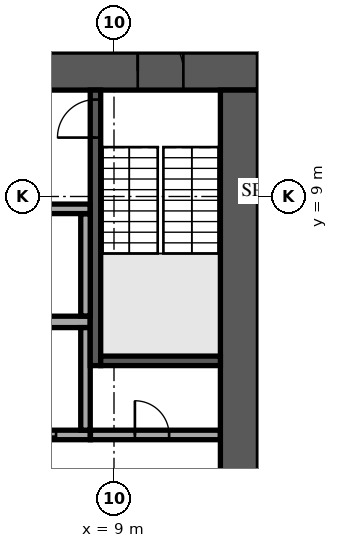
"""IFC4 building model, lengths in metres.
Left out: names, types, materials, properties, quantities, classifications, styles, units other than length and angle.
Written with IfcOpenShell. Run it as: python <this file> out.ifc"""

import sys

from ifc_helpers import new_model, si_unit, direction, frame, frame_2d, origin, place, context, subcontext, project, spatial, rectangle, extrude, element, fill, save


model = new_model("IFC4")
c1 = context("Model", 3, precision=1e-05, world=origin(), true_north=direction((0.0, 1.0)))
c2 = subcontext(c1, "Body", "Model", "MODEL_VIEW")
j1 = project(units=[si_unit("LENGTHUNIT", "METRE"), si_unit("PLANEANGLEUNIT", "RADIAN")], contexts=[c1])
p1 = place(None, origin())
s1 = spatial("IfcSite", under=j1, at=p1, CompositionType="ELEMENT")
p2 = place(p1, origin())
s2 = spatial("IfcBuilding", under=s1, at=p2, CompositionType="ELEMENT")
p3 = place(p2, frame((0.0, 0.0, 175.7)))
s3 = spatial("IfcBuildingStorey", under=s2, at=p3, CompositionType="ELEMENT", Elevation=175.7)
p4 = place(p3, frame((-12.8, 12.3, 0.0), z_axis=(0.0, 0.0, 1.0), x_axis=(1.0, 0.0, 0.0)))
e1 = element("IfcWall", 1, at=p4, inside=s3, PredefinedType="SHEAR", context=c2, shape_type="SweptSolid", body=[
    extrude(rectangle(XDim=25.6, YDim=1.0, at=frame_2d((12.8, 0.0))), origin(), (0.0, 0.0, 1.0), 3.6),
])
p5 = place(p4, frame((11.6, 0.0, 0.0)))
e2 = element("IfcOpeningElement", 2, at=p5, cuts=e1, PredefinedType="OPENING", context=c2, shape_type="SweptSolid", body=[
    extrude(rectangle(XDim=2.4, YDim=2.4, at=frame_2d((1.2, 1.2))), frame((0.0, 0.51, 0.0), z_axis=(0.0, -1.0, 0.0), x_axis=(1.0, 0.0, 0.0)), (0.0, 0.0, 1.0), 1.02),
])
p6 = place(p4, frame((22.425, 0.0, 0.0)))
e3 = element("IfcOpeningElement", 3, at=p6, cuts=e1, PredefinedType="OPENING", context=c2, shape_type="SweptSolid", body=[
    extrude(rectangle(XDim=1.2, YDim=2.1, at=frame_2d((0.6, 1.05))), frame((0.0, 0.51, 0.0), z_axis=(0.0, -1.0, 0.0), x_axis=(1.0, 0.0, 0.0)), (0.0, 0.0, 1.0), 1.02),
])
p7 = place(p4, frame((1.4, 0.0, 0.0)))
e4 = element("IfcOpeningElement", 4, at=p7, cuts=e1, PredefinedType="OPENING", context=c2, shape_type="SweptSolid", body=[
    extrude(rectangle(XDim=1.0, YDim=2.1, at=frame_2d((0.5, 1.05))), frame((0.0, 0.51, 0.0), z_axis=(0.0, -1.0, 0.0), x_axis=(1.0, 0.0, 0.0)), (0.0, 0.0, 1.0), 1.02),
])
p8 = place(p3, frame((12.3, -11.8, 0.0), z_axis=(0.0, 0.0, 1.0), x_axis=(0.0, 1.0, 0.0)))
e5 = element("IfcWall", 5, at=p8, inside=s3, PredefinedType="SHEAR", context=c2, shape_type="SweptSolid", body=[
    extrude(rectangle(XDim=23.6, YDim=1.0, at=frame_2d((11.8, 0.0))), origin(), (0.0, 0.0, 1.0), 3.6),
])
p9 = place(p8, frame((10.6, 0.0, 0.0)))
e6 = element("IfcOpeningElement", 6, at=p9, cuts=e5, PredefinedType="OPENING", context=c2, shape_type="SweptSolid", body=[
    extrude(rectangle(XDim=2.4, YDim=2.4, at=frame_2d((1.2, 1.2))), frame((0.0, 0.51, 0.0), z_axis=(0.0, -1.0, 0.0), x_axis=(1.0, 0.0, 0.0)), (0.0, 0.0, 1.0), 1.02),
])
p10 = place(p3, frame((-8.375, 5.7, 0.0), z_axis=(0.0, 0.0, 1.0), x_axis=(1.0, 0.0, 0.0)))
e7 = element("IfcWall", 7, at=p10, inside=s3, PredefinedType="SOLIDWALL", context=c2, shape_type="SweptSolid", body=[
    extrude(rectangle(XDim=16.75, YDim=0.3, at=frame_2d((8.375, 0.0))), origin(), (0.0, 0.0, 1.0), 3.6),
])
p11 = place(p3, frame((-8.375, 2.725, 0.0), z_axis=(0.0, 0.0, 1.0), x_axis=(1.0, 0.0, 0.0)))
e8 = element("IfcWall", 8, at=p11, inside=s3, PredefinedType="SOLIDWALL", context=c2, shape_type="SweptSolid", body=[
    extrude(rectangle(XDim=16.75, YDim=0.25, at=frame_2d((8.375, 0.0))), origin(), (0.0, 0.0, 1.0), 3.6),
])
p12 = place(p11, frame((0.9, 0.0, 0.0)))
e9 = element("IfcOpeningElement", 9, at=p12, cuts=e8, PredefinedType="OPENING", context=c2, shape_type="SweptSolid", body=[
    extrude(rectangle(XDim=1.2, YDim=2.1, at=frame_2d((0.6, 1.05))), frame((0.0, 0.135, 0.0), z_axis=(0.0, -1.0, 0.0), x_axis=(1.0, 0.0, 0.0)), (0.0, 0.0, 1.0), 0.27),
])
p13 = place(p11, frame((3.65, 0.0, 0.0)))
e10 = element("IfcOpeningElement", 10, at=p13, cuts=e8, PredefinedType="OPENING", context=c2, shape_type="SweptSolid", body=[
    extrude(rectangle(XDim=1.2, YDim=2.1, at=frame_2d((0.6, 1.05))), frame((0.0, 0.135, 0.0), z_axis=(0.0, -1.0, 0.0), x_axis=(1.0, 0.0, 0.0)), (0.0, 0.0, 1.0), 0.27),
])
p14 = place(p11, frame((6.4, 0.0, 0.0)))
e11 = element("IfcOpeningElement", 11, at=p14, cuts=e8, PredefinedType="OPENING", context=c2, shape_type="SweptSolid", body=[
    extrude(rectangle(XDim=1.2, YDim=2.1, at=frame_2d((0.6, 1.05))), frame((0.0, 0.135, 0.0), z_axis=(0.0, -1.0, 0.0), x_axis=(1.0, 0.0, 0.0)), (0.0, 0.0, 1.0), 0.27),
])
p15 = place(p11, frame((9.15, 0.0, 0.0)))
e12 = element("IfcOpeningElement", 12, at=p15, cuts=e8, PredefinedType="OPENING", context=c2, shape_type="SweptSolid", body=[
    extrude(rectangle(XDim=1.2, YDim=2.1, at=frame_2d((0.6, 1.05))), frame((0.0, 0.135, 0.0), z_axis=(0.0, -1.0, 0.0), x_axis=(1.0, 0.0, 0.0)), (0.0, 0.0, 1.0), 0.27),
])
p16 = place(p11, frame((11.9, 0.0, 0.0)))
e13 = element("IfcOpeningElement", 13, at=p16, cuts=e8, PredefinedType="OPENING", context=c2, shape_type="SweptSolid", body=[
    extrude(rectangle(XDim=1.2, YDim=2.1, at=frame_2d((0.6, 1.05))), frame((0.0, 0.135, 0.0), z_axis=(0.0, -1.0, 0.0), x_axis=(1.0, 0.0, 0.0)), (0.0, 0.0, 1.0), 0.27),
])
p17 = place(p11, frame((14.65, 0.0, 0.0)))
e14 = element("IfcOpeningElement", 14, at=p17, cuts=e8, PredefinedType="OPENING", context=c2, shape_type="SweptSolid", body=[
    extrude(rectangle(XDim=1.2, YDim=2.1, at=frame_2d((0.6, 1.05))), frame((0.0, 0.135, 0.0), z_axis=(0.0, -1.0, 0.0), x_axis=(1.0, 0.0, 0.0)), (0.0, 0.0, 1.0), 0.27),
])
p18 = place(p3, frame((8.25, 2.85, 0.0), z_axis=(0.0, 0.0, 1.0), x_axis=(0.0, 1.0, 0.0)))
e15 = element("IfcWall", 15, at=p18, inside=s3, PredefinedType="SOLIDWALL", context=c2, shape_type="SweptSolid", body=[
    extrude(rectangle(XDim=2.7, YDim=0.25, at=frame_2d((1.35, 0.0))), origin(), (0.0, 0.0, 1.0), 3.6),
])
p19 = place(p3, frame((8.512, 4.55, 0.0), z_axis=(0.0, 0.0, 1.0), x_axis=(0.0, 1.0, 0.0)))
e16 = element("IfcWall", 16, at=p19, inside=s3, PredefinedType="SOLIDWALL", context=c2, shape_type="SweptSolid", body=[
    extrude(rectangle(XDim=7.25, YDim=0.275, at=frame_2d((3.625, 0.0))), origin(), (0.0, 0.0, 1.0), 3.6),
])
p20 = place(p19, frame((6.0, 0.0, 0.0)))
e17 = element("IfcOpeningElement", 17, at=p20, cuts=e16, PredefinedType="OPENING", context=c2, shape_type="SweptSolid", body=[
    extrude(rectangle(XDim=1.0, YDim=2.1, at=frame_2d((0.5, 1.05))), frame((0.0, 0.147, 0.0), z_axis=(0.0, -1.0, 0.0), x_axis=(1.0, 0.0, 0.0)), (0.0, 0.0, 1.0), 0.295),
])
p21 = place(p3, frame((8.65, 4.675, 0.0), z_axis=(0.0, 0.0, 1.0), x_axis=(1.0, 0.0, 0.0)))
e18 = element("IfcWall", 18, at=p21, inside=s3, PredefinedType="SOLIDWALL", context=c2, shape_type="SweptSolid", body=[
    extrude(rectangle(XDim=3.15, YDim=0.25, at=frame_2d((1.575, 0.0))), origin(), (0.0, 0.0, 1.0), 3.6),
])
p22 = place(p3, frame((8.38, 2.725, 0.0), z_axis=(0.0, 0.0, 1.0), x_axis=(1.0, 0.0, 0.0)))
e19 = element("IfcWall", 19, at=p22, inside=s3, PredefinedType="PARTITIONING", context=c2, shape_type="SweptSolid", body=[
    extrude(rectangle(XDim=3.415, YDim=0.25, at=frame_2d((1.708, 0.0))), origin(), (0.0, 0.0, 1.0), 3.6),
])
p23 = place(p22, frame((1.17, 0.0, 0.0)))
e20 = element("IfcOpeningElement", 20, at=p23, cuts=e19, PredefinedType="OPENING", context=c2, shape_type="SweptSolid", body=[
    extrude(rectangle(XDim=0.9, YDim=2.1, at=frame_2d((0.45, 1.05))), frame((0.0, 0.135, 0.0), z_axis=(0.0, -1.0, 0.0), x_axis=(1.0, 0.0, 0.0)), (0.0, 0.0, 1.0), 0.27),
])
p24 = place(p3, frame((8.25, 5.855, 0.0), z_axis=(0.0, 0.0, 1.0), x_axis=(0.0, 1.0, 0.0)))
e21 = element("IfcWall", 21, at=p24, inside=s3, PredefinedType="PARTITIONING", context=c2, shape_type="SweptSolid", body=[
    extrude(rectangle(XDim=2.69, YDim=0.25, at=frame_2d((1.345, 0.0))), origin(), (0.0, 0.0, 1.0), 3.6),
])
p25 = place(p3, frame((-8.35, 8.675, 0.0), z_axis=(0.0, 0.0, 1.0), x_axis=(1.0, 0.0, 0.0)))
e22 = element("IfcWall", 22, at=p25, inside=s3, PredefinedType="PARTITIONING", context=c2, shape_type="SweptSolid", body=[
    extrude(rectangle(XDim=16.72, YDim=0.25, at=frame_2d((8.36, 0.0))), origin(), (0.0, 0.0, 1.0), 3.6),
])
p26 = place(p25, frame((0.975, 0.0, 0.0)))
e23 = element("IfcOpeningElement", 23, at=p26, cuts=e22, PredefinedType="OPENING", context=c2, shape_type="SweptSolid", body=[
    extrude(rectangle(XDim=1.0, YDim=2.1, at=frame_2d((0.5, 1.05))), frame((0.0, 0.135, 0.0), z_axis=(0.0, -1.0, 0.0), x_axis=(1.0, 0.0, 0.0)), (0.0, 0.0, 1.0), 0.27),
])
p27 = place(p25, frame((3.725, 0.0, 0.0)))
e24 = element("IfcOpeningElement", 24, at=p27, cuts=e22, PredefinedType="OPENING", context=c2, shape_type="SweptSolid", body=[
    extrude(rectangle(XDim=1.0, YDim=2.1, at=frame_2d((0.5, 1.05))), frame((0.0, 0.135, 0.0), z_axis=(0.0, -1.0, 0.0), x_axis=(1.0, 0.0, 0.0)), (0.0, 0.0, 1.0), 0.27),
])
p28 = place(p25, frame((9.125, 0.0, 0.0)))
e25 = element("IfcOpeningElement", 25, at=p28, cuts=e22, PredefinedType="OPENING", context=c2, shape_type="SweptSolid", body=[
    extrude(rectangle(XDim=1.2, YDim=2.1, at=frame_2d((0.6, 1.05))), frame((0.0, 0.135, 0.0), z_axis=(0.0, -1.0, 0.0), x_axis=(1.0, 0.0, 0.0)), (0.0, 0.0, 1.0), 0.27),
])
p29 = place(p3, frame((36.503, 1.52, 0.0), z_axis=(0.0, 0.0, 1.0), x_axis=(-0.615660779349, 0.788011297363, 0.0)))
e26 = element("IfcWall", 26, at=p29, inside=s3, PredefinedType="STANDARD", context=c2, shape_type="SweptSolid", body=[
    extrude(rectangle(XDim=42.176, YDim=0.6, at=frame_2d((21.088, 0.0))), origin(), (0.0, 0.0, 1.0), 3.6),
])
p30 = place(p29, frame((1.138, 0.0, 0.9)))
e27 = element("IfcOpeningElement", 27, at=p30, cuts=e26, PredefinedType="OPENING", context=c2, shape_type="SweptSolid", body=[
    extrude(rectangle(XDim=2.3, YDim=2.1, at=frame_2d((1.15, 1.05))), frame((0.0, 0.31, 0.0), z_axis=(0.0, -1.0, 0.0), x_axis=(1.0, 0.0, 0.0)), (0.0, 0.0, 1.0), 0.62),
])
p31 = place(p29, frame((5.776, 0.0, 0.9)))
e28 = element("IfcOpeningElement", 28, at=p31, cuts=e26, PredefinedType="OPENING", context=c2, shape_type="SweptSolid", body=[
    extrude(rectangle(XDim=2.3, YDim=2.1, at=frame_2d((1.15, 1.05))), frame((0.0, 0.31, 0.0), z_axis=(0.0, -1.0, 0.0), x_axis=(1.0, 0.0, 0.0)), (0.0, 0.0, 1.0), 0.62),
])
p32 = place(p29, frame((10.476, 0.0, 0.9)))
e29 = element("IfcOpeningElement", 29, at=p32, cuts=e26, PredefinedType="OPENING", context=c2, shape_type="SweptSolid", body=[
    extrude(rectangle(XDim=2.3, YDim=2.1, at=frame_2d((1.15, 1.05))), frame((0.0, 0.31, 0.0), z_axis=(0.0, -1.0, 0.0), x_axis=(1.0, 0.0, 0.0)), (0.0, 0.0, 1.0), 0.62),
])
p33 = place(p29, frame((15.176, 0.0, 0.9)))
e30 = element("IfcOpeningElement", 30, at=p33, cuts=e26, PredefinedType="OPENING", context=c2, shape_type="SweptSolid", body=[
    extrude(rectangle(XDim=2.3, YDim=2.1, at=frame_2d((1.15, 1.05))), frame((0.0, 0.31, 0.0), z_axis=(0.0, -1.0, 0.0), x_axis=(1.0, 0.0, 0.0)), (0.0, 0.0, 1.0), 0.62),
])
p34 = place(p29, frame((19.876, 0.0, 0.9)))
e31 = element("IfcOpeningElement", 31, at=p34, cuts=e26, PredefinedType="OPENING", context=c2, shape_type="SweptSolid", body=[
    extrude(rectangle(XDim=2.3, YDim=2.1, at=frame_2d((1.15, 1.05))), frame((0.0, 0.31, 0.0), z_axis=(0.0, -1.0, 0.0), x_axis=(1.0, 0.0, 0.0)), (0.0, 0.0, 1.0), 0.62),
])
p35 = place(p29, frame((24.576, 0.0, 0.9)))
e32 = element("IfcOpeningElement", 32, at=p35, cuts=e26, PredefinedType="OPENING", context=c2, shape_type="SweptSolid", body=[
    extrude(rectangle(XDim=2.3, YDim=2.1, at=frame_2d((1.15, 1.05))), frame((0.0, 0.31, 0.0), z_axis=(0.0, -1.0, 0.0), x_axis=(1.0, 0.0, 0.0)), (0.0, 0.0, 1.0), 0.62),
])
p36 = place(p29, frame((33.976, 0.0, 0.9)))
e33 = element("IfcOpeningElement", 33, at=p36, cuts=e26, PredefinedType="OPENING", context=c2, shape_type="SweptSolid", body=[
    extrude(rectangle(XDim=2.3, YDim=2.1, at=frame_2d((1.15, 1.05))), frame((0.0, 0.31, 0.0), z_axis=(0.0, -1.0, 0.0), x_axis=(1.0, 0.0, 0.0)), (0.0, 0.0, 1.0), 0.62),
])
p37 = place(p29, frame((38.676, 0.0, 0.9)))
e34 = element("IfcOpeningElement", 34, at=p37, cuts=e26, PredefinedType="OPENING", context=c2, shape_type="SweptSolid", body=[
    extrude(rectangle(XDim=2.3, YDim=2.1, at=frame_2d((1.15, 1.05))), frame((0.0, 0.31, 0.0), z_axis=(0.0, -1.0, 0.0), x_axis=(1.0, 0.0, 0.0)), (0.0, 0.0, 1.0), 0.62),
])
p38 = place(p3, frame((9.713, 25.187, 0.0), z_axis=(0.0, 0.0, 1.0), x_axis=(0.615659714696, -0.788012129158, 0.0)))
e35 = element("IfcWall", 35, at=p38, inside=s3, PredefinedType="PARTITIONING", context=c2, shape_type="SweptSolid", body=[
    extrude(rectangle(XDim=27.811, YDim=0.15, at=frame_2d((13.905, 0.0))), origin(), (0.0, 0.0, 1.0), 3.15),
])
p39 = place(p38, frame((8.299, 0.0, 0.0)))
e36 = element("IfcOpeningElement", 36, at=p39, cuts=e35, PredefinedType="OPENING", context=c2, shape_type="SweptSolid", body=[
    extrude(rectangle(XDim=1.0, YDim=2.1, at=frame_2d((0.5, 1.05))), frame((0.0, 0.085, 0.0), z_axis=(0.0, -1.0, 0.0), x_axis=(1.0, 0.0, 0.0)), (0.0, 0.0, 1.0), 0.17),
])
p40 = place(p38, frame((15.951, 0.0, 0.0)))
e37 = element("IfcOpeningElement", 37, at=p40, cuts=e35, PredefinedType="OPENING", context=c2, shape_type="SweptSolid", body=[
    extrude(rectangle(XDim=1.0, YDim=2.1, at=frame_2d((0.5, 1.05))), frame((0.0, 0.085, 0.0), z_axis=(0.0, -1.0, 0.0), x_axis=(1.0, 0.0, 0.0)), (0.0, 0.0, 1.0), 0.17),
])
p41 = place(p6, origin())
e38 = element("IfcDoor", 38, at=p41, inside=s3, OperationType="SINGLE_SWING_LEFT", PredefinedType="DOOR", context=c2, shape_type="SweptSolid", body=[
    extrude(rectangle(XDim=1.2, YDim=2.1, at=frame_2d((0.6, 1.05))), frame((0.0, 0.025, 0.0), z_axis=(0.0, -1.0, 0.0), x_axis=(1.0, 0.0, 0.0)), (0.0, 0.0, 1.0), 0.05),
])
fill(e3, e38)
p42 = place(p17, origin())
e39 = element("IfcDoor", 39, at=p42, inside=s3, OperationType="DOUBLE_DOOR_SLIDING", PredefinedType="DOOR", context=c2, shape_type="SweptSolid", body=[
    extrude(rectangle(XDim=1.2, YDim=2.1, at=frame_2d((0.6, 1.05))), frame((0.0, 0.025, 0.0), z_axis=(0.0, -1.0, 0.0), x_axis=(1.0, 0.0, 0.0)), (0.0, 0.0, 1.0), 0.05),
])
fill(e14, e39)
p43 = place(p20, origin())
e40 = element("IfcDoor", 40, at=p43, inside=s3, OperationType="SINGLE_SWING_LEFT", PredefinedType="DOOR", context=c2, shape_type="SweptSolid", body=[
    extrude(rectangle(XDim=1.0, YDim=2.1, at=frame_2d((0.5, 1.05))), frame((0.0, 0.025, 0.0), z_axis=(0.0, -1.0, 0.0), x_axis=(1.0, 0.0, 0.0)), (0.0, 0.0, 1.0), 0.05),
])
fill(e17, e40)
p44 = place(p23, origin())
e41 = element("IfcDoor", 41, at=p44, inside=s3, OperationType="SINGLE_SWING_RIGHT", PredefinedType="DOOR", context=c2, shape_type="SweptSolid", body=[
    extrude(rectangle(XDim=0.9, YDim=2.1, at=frame_2d((0.45, 1.05))), frame((0.0, 0.025, 0.0), z_axis=(0.0, -1.0, 0.0), x_axis=(1.0, 0.0, 0.0)), (0.0, 0.0, 1.0), 0.05),
])
fill(e20, e41)
save(model, sys.argv[1])
